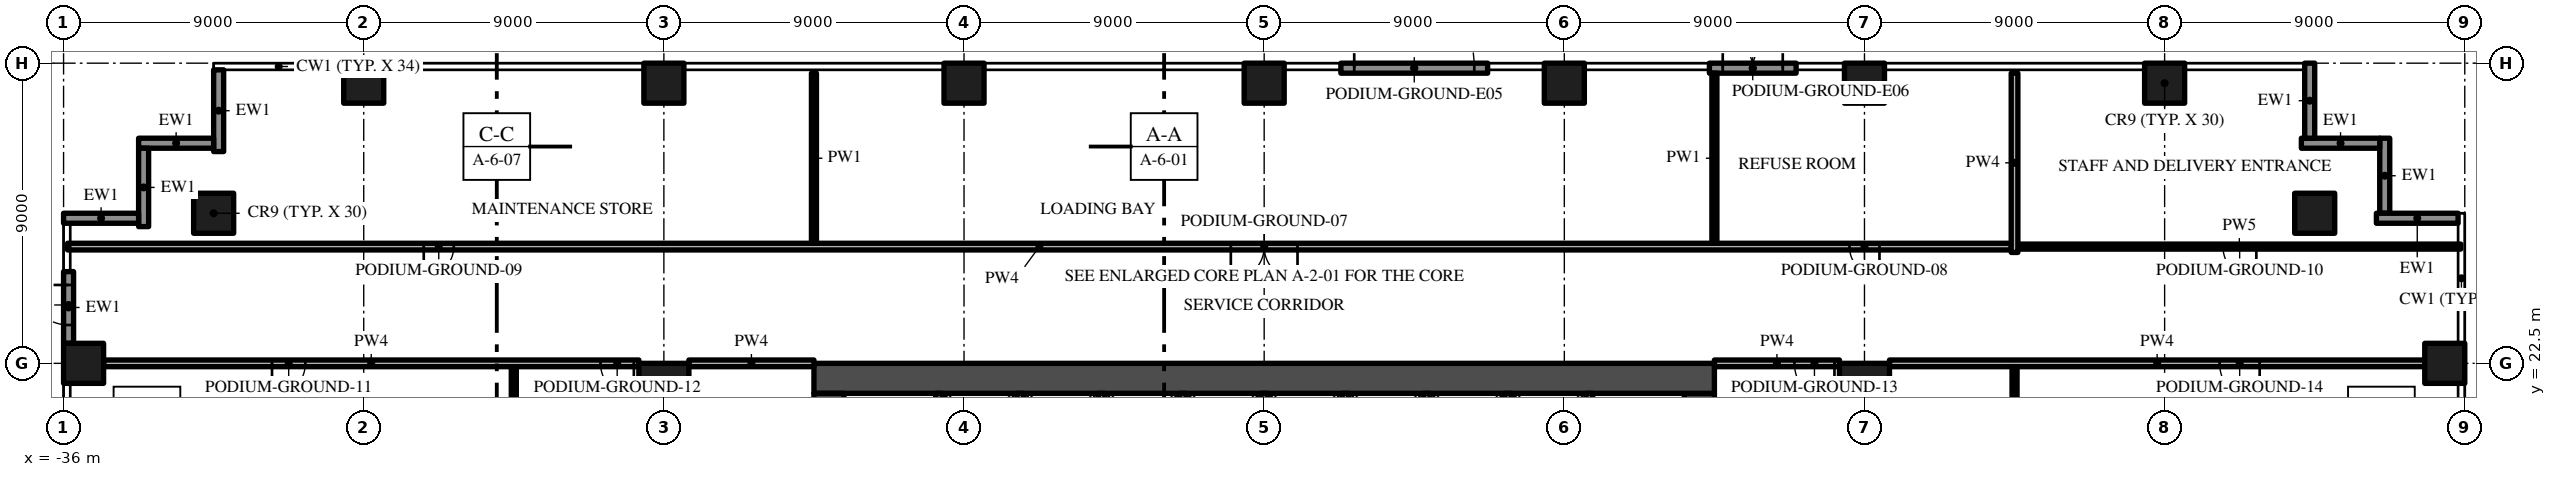
"""IFC4 building model, lengths in metres.
Left out: names, types, materials, properties, quantities, classifications, styles, units other than length and angle.
Written with IfcOpenShell. Run it as: python <this file> out.ifc"""

import sys

from ifc_helpers import new_model, si_unit, direction, frame, frame_2d, origin, origin_2d, place, context, subcontext, project, spatial, rectangle, extrude, element, fill, save


model = new_model("IFC4")
c1 = context("Model", 3, precision=1e-05, world=origin(), true_north=direction((0.0, 1.0)))
c2 = subcontext(c1, "Body", "Model", "MODEL_VIEW")
j1 = project(units=[si_unit("LENGTHUNIT", "METRE"), si_unit("PLANEANGLEUNIT", "RADIAN")], contexts=[c1])
p1 = place(None, origin())
s1 = spatial("IfcSite", under=j1, at=p1, CompositionType="ELEMENT")
p2 = place(p1, origin())
s2 = spatial("IfcBuilding", under=s1, at=p2, CompositionType="ELEMENT")
p3 = place(p2, origin())
s3 = spatial("IfcBuildingStorey", under=s2, at=p3, CompositionType="ELEMENT", Elevation=0.0)
p4 = place(p3, frame((13.05, 5.4, -2.2), z_axis=(0.0, 0.0, 1.0), x_axis=(0.0, 1.0, 0.0)))
e1 = element("IfcWall", 1, at=p4, inside=s3, PredefinedType="SHEAR", context=c2, shape_type="SweptSolid", body=[
    extrude(rectangle(XDim=16.2, YDim=0.9, at=frame_2d((8.1, 0.0))), origin(), (0.0, 0.0, 1.0), 7.8),
])
p5 = place(p4, frame((6.0, 0.0, 2.2)))
e2 = element("IfcOpeningElement", 2, at=p5, cuts=e1, PredefinedType="OPENING", context=c2, shape_type="SweptSolid", body=[
    extrude(rectangle(XDim=1.2, YDim=2.2, at=frame_2d((0.6, 1.1))), frame((0.0, 0.46, 0.0), z_axis=(0.0, -1.0, 0.0), x_axis=(1.0, 0.0, 0.0)), (0.0, 0.0, 1.0), 0.92),
])
p6 = place(p3, frame((13.5, 22.05, -2.2), z_axis=(0.0, 0.0, 1.0), x_axis=(-1.0, 0.0, 0.0)))
e3 = element("IfcWall", 3, at=p6, inside=s3, PredefinedType="SHEAR", context=c2, shape_type="SweptSolid", body=[
    extrude(rectangle(XDim=27.0, YDim=0.9, at=frame_2d((13.5, 0.0))), origin(), (0.0, 0.0, 1.0), 7.8),
])
p7 = place(p3, frame((-13.05, 21.6, -2.2), z_axis=(0.0, 0.0, 1.0), x_axis=(0.0, -1.0, 0.0)))
e4 = element("IfcWall", 4, at=p7, inside=s3, PredefinedType="SHEAR", context=c2, shape_type="SweptSolid", body=[
    extrude(rectangle(XDim=16.2, YDim=0.9, at=frame_2d((8.1, 0.0))), origin(), (0.0, 0.0, 1.0), 7.8),
])
p8 = place(p7, frame((9.0, 0.0, 2.2)))
e5 = element("IfcOpeningElement", 5, at=p8, cuts=e4, PredefinedType="OPENING", context=c2, shape_type="SweptSolid", body=[
    extrude(rectangle(XDim=1.2, YDim=2.2, at=frame_2d((0.6, 1.1))), frame((0.0, 0.46, 0.0), z_axis=(0.0, -1.0, 0.0), x_axis=(1.0, 0.0, 0.0)), (0.0, 0.0, 1.0), 0.92),
])
for number, where, z_axis, x_axis in (
    (6, (-18.0, 30.9, 0.0), (0.0, 0.0, 1.0), (1.0, 0.0, 0.0)),
    (7, (-27.0, 30.9, 0.0), (0.0, 0.0, 1.0), (1.0, 0.0, 0.0)),
    (8, (-35.4, 22.5, 0.0), (0.0, 0.0, 1.0), (1.0, 0.0, 0.0)),
    (9, (-31.5, 27.0, 0.0), (0.0, 0.0, 1.0), (1.0, 0.0, 0.0)),
    (10, (-9.0, 30.9, 0.0), (0.0, 0.0, 1.0), (1.0, 0.0, 0.0)),
    (11, (0.0, 30.9, 0.0), (0.0, 0.0, 1.0), (1.0, 0.0, 0.0)),
    (12, (18.0, 30.9, 0.0), (0.0, 0.0, 1.0), (1.0, 0.0, 0.0)),
    (13, (27.0, 30.9, 0.0), (0.0, 0.0, 1.0), (1.0, 0.0, 0.0)),
    (14, (35.4, 22.5, 0.0), (0.0, 0.0, 1.0), (1.0, 0.0, 0.0)),
    (15, (31.5, 27.0, 0.0), (0.0, 0.0, 1.0), (1.0, 0.0, 0.0)),
    (16, (9.0, 30.9, 0.0), (0.0, 0.0, 1.0), (1.0, 0.0, 0.0)),
):
    element("IfcColumn", number, at=place(p3, frame(where, z_axis=z_axis, x_axis=x_axis)), inside=s3, PredefinedType="COLUMN", context=c2, shape_type="SweptSolid", body=[
        extrude(rectangle(XDim=1.2, YDim=1.2, at=origin_2d()), origin(), (0.0, 0.0, 1.0), 5.6),
    ])
for number, where, z_axis, x_axis in (
    (17, (-18.0, 21.75, 0.0), (0.0, 0.0, 1.0), (1.0, 0.0, 0.0)),
    (18, (18.0, 21.75, 0.0), (0.0, 0.0, 1.0), (1.0, 0.0, 0.0)),
):
    element("IfcColumn", number, at=place(p3, frame(where, z_axis=z_axis, x_axis=x_axis)), inside=s3, PredefinedType="COLUMN", context=c2, shape_type="SweptSolid", body=[
        extrude(rectangle(XDim=1.5, YDim=1.5, at=origin_2d()), origin(), (0.0, 0.0, 1.0), 5.6),
    ])
p9 = place(p3, frame((33.35, 26.85, 0.0), z_axis=(0.0, 0.0, 1.0), x_axis=(1.0, 0.0, 0.0)))
e19 = element("IfcWall", 19, at=p9, inside=s3, PredefinedType="SOLIDWALL", context=c2, shape_type="SweptSolid", body=[
    extrude(rectangle(XDim=2.45, YDim=0.3, at=frame_2d((1.225, 0.0))), origin(), (0.0, 0.0, 1.0), 5.6),
])
p10 = place(p3, frame((33.6, 29.25, 0.0), z_axis=(0.0, 0.0, 1.0), x_axis=(0.0, -1.0, 0.0)))
e20 = element("IfcWall", 20, at=p10, inside=s3, PredefinedType="SOLIDWALL", context=c2, shape_type="SweptSolid", body=[
    extrude(rectangle(XDim=2.25, YDim=0.3, at=frame_2d((1.125, 0.0))), origin(), (0.0, 0.0, 1.0), 5.6),
])
p11 = place(p3, frame((31.1, 29.1, 0.0), z_axis=(0.0, 0.0, 1.0), x_axis=(1.0, 0.0, 0.0)))
e21 = element("IfcWall", 21, at=p11, inside=s3, PredefinedType="SOLIDWALL", context=c2, shape_type="SweptSolid", body=[
    extrude(rectangle(XDim=2.35, YDim=0.3, at=frame_2d((1.175, 0.0))), origin(), (0.0, 0.0, 1.0), 5.6),
])
p12 = place(p3, frame((31.35, 31.5, 0.0), z_axis=(0.0, 0.0, 1.0), x_axis=(0.0, -1.0, 0.0)))
e22 = element("IfcWall", 22, at=p12, inside=s3, PredefinedType="SOLIDWALL", context=c2, shape_type="SweptSolid", body=[
    extrude(rectangle(XDim=2.25, YDim=0.3, at=frame_2d((1.125, 0.0))), origin(), (0.0, 0.0, 1.0), 5.6),
])
p13 = place(p3, frame((2.3, 31.35, 0.0), z_axis=(0.0, 0.0, 1.0), x_axis=(1.0, 0.0, 0.0)))
e23 = element("IfcWall", 23, at=p13, inside=s3, PredefinedType="SOLIDWALL", context=c2, shape_type="SweptSolid", body=[
    extrude(rectangle(XDim=4.4, YDim=0.3, at=frame_2d((2.2, 0.0))), origin(), (0.0, 0.0, 1.0), 5.6),
])
p14 = place(p13, frame((0.4, 0.0, 0.0)))
e24 = element("IfcOpeningElement", 24, at=p14, cuts=e23, PredefinedType="OPENING", context=c2, shape_type="SweptSolid", body=[
    extrude(rectangle(XDim=3.6, YDim=3.0, at=frame_2d((1.8, 1.5))), frame((0.0, 0.16, 0.0), z_axis=(0.0, -1.0, 0.0), x_axis=(1.0, 0.0, 0.0)), (0.0, 0.0, 1.0), 0.32),
])
p15 = place(p3, frame((13.35, 31.35, 0.0), z_axis=(0.0, 0.0, 1.0), x_axis=(1.0, 0.0, 0.0)))
e25 = element("IfcWall", 25, at=p15, inside=s3, PredefinedType="SOLIDWALL", context=c2, shape_type="SweptSolid", body=[
    extrude(rectangle(XDim=2.6, YDim=0.3, at=frame_2d((1.3, 0.0))), origin(), (0.0, 0.0, 1.0), 5.6),
])
p16 = place(p15, frame((0.4, 0.0, 0.0)))
e26 = element("IfcOpeningElement", 26, at=p16, cuts=e25, PredefinedType="OPENING", context=c2, shape_type="SweptSolid", body=[
    extrude(rectangle(XDim=1.8, YDim=2.4, at=frame_2d((0.9, 1.2))), frame((0.0, 0.16, 0.0), z_axis=(0.0, -1.0, 0.0), x_axis=(1.0, 0.0, 0.0)), (0.0, 0.0, 1.0), 0.32),
])
p17 = place(p3, frame((-31.35, 28.85, 0.0), z_axis=(0.0, 0.0, 1.0), x_axis=(0.0, 1.0, 0.0)))
e27 = element("IfcWall", 27, at=p17, inside=s3, PredefinedType="SOLIDWALL", context=c2, shape_type="SweptSolid", body=[
    extrude(rectangle(XDim=2.45, YDim=0.3, at=frame_2d((1.225, 0.0))), origin(), (0.0, 0.0, 1.0), 5.6),
])
p18 = place(p3, frame((-33.75, 29.1, 0.0), z_axis=(0.0, 0.0, 1.0), x_axis=(1.0, 0.0, 0.0)))
e28 = element("IfcWall", 28, at=p18, inside=s3, PredefinedType="SOLIDWALL", context=c2, shape_type="SweptSolid", body=[
    extrude(rectangle(XDim=2.25, YDim=0.3, at=frame_2d((1.125, 0.0))), origin(), (0.0, 0.0, 1.0), 5.6),
])
p19 = place(p3, frame((-33.6, 26.6, 0.0), z_axis=(0.0, 0.0, 1.0), x_axis=(0.0, 1.0, 0.0)))
e29 = element("IfcWall", 29, at=p19, inside=s3, PredefinedType="SOLIDWALL", context=c2, shape_type="SweptSolid", body=[
    extrude(rectangle(XDim=2.35, YDim=0.3, at=frame_2d((1.175, 0.0))), origin(), (0.0, 0.0, 1.0), 5.6),
])
p20 = place(p3, frame((-36.0, 26.85, 0.0), z_axis=(0.0, 0.0, 1.0), x_axis=(1.0, 0.0, 0.0)))
e30 = element("IfcWall", 30, at=p20, inside=s3, PredefinedType="SOLIDWALL", context=c2, shape_type="SweptSolid", body=[
    extrude(rectangle(XDim=2.25, YDim=0.3, at=frame_2d((1.125, 0.0))), origin(), (0.0, 0.0, 1.0), 5.6),
])
p21 = place(p3, frame((-35.85, 23.1, 0.0), z_axis=(0.0, 0.0, 1.0), x_axis=(0.0, 1.0, 0.0)))
e31 = element("IfcWall", 31, at=p21, inside=s3, PredefinedType="SOLIDWALL", context=c2, shape_type="SweptSolid", body=[
    extrude(rectangle(XDim=2.15, YDim=0.3, at=frame_2d((1.075, 0.0))), origin(), (0.0, 0.0, 1.0), 5.6),
])
p22 = place(p21, frame((0.55, 0.0, 0.0)))
e32 = element("IfcOpeningElement", 32, at=p22, cuts=e31, PredefinedType="OPENING", context=c2, shape_type="SweptSolid", body=[
    extrude(rectangle(XDim=1.2, YDim=2.4, at=frame_2d((0.6, 1.2))), frame((0.0, 0.16, 0.0), z_axis=(0.0, -1.0, 0.0), x_axis=(1.0, 0.0, 0.0)), (0.0, 0.0, 1.0), 0.32),
])
for number, where, z_axis, x_axis in (
    (33, (-9.75, 19.4, -0.4), (0.0, 0.0, 1.0), (0.0, 1.0, 0.0)),
    (34, (-7.312, 19.4, -0.4), (0.0, 0.0, 1.0), (0.0, 1.0, 0.0)),
    (35, (-4.875, 19.4, -0.4), (0.0, 0.0, 1.0), (0.0, 1.0, 0.0)),
    (36, (-2.438, 19.4, -0.4), (0.0, 0.0, 1.0), (0.0, 1.0, 0.0)),
    (37, (0.0, 19.4, -0.4), (0.0, 0.0, 1.0), (0.0, 1.0, 0.0)),
    (38, (2.438, 19.4, -0.4), (0.0, 0.0, 1.0), (0.0, 1.0, 0.0)),
    (39, (4.875, 19.4, -0.4), (0.0, 0.0, 1.0), (0.0, 1.0, 0.0)),
    (40, (7.312, 19.4, -0.4), (0.0, 0.0, 1.0), (0.0, 1.0, 0.0)),
    (41, (9.75, 19.4, -0.4), (0.0, 0.0, 1.0), (0.0, 1.0, 0.0)),
):
    element("IfcWall", number, at=place(p3, frame(where, z_axis=z_axis, x_axis=x_axis)), inside=s3, PredefinedType="PARTITIONING", context=c2, shape_type="SweptSolid", body=[
        extrude(rectangle(XDim=2.2, YDim=0.2, at=frame_2d((1.1, 0.0))), origin(), (0.0, 0.0, 1.0), 6.0),
    ])
p23 = place(p3, frame((-18.75, 22.5, 0.0), z_axis=(0.0, 0.0, 1.0), x_axis=(-1.0, 0.0, 0.0)))
e42 = element("IfcWall", 42, at=p23, inside=s3, PredefinedType="PARTITIONING", context=c2, shape_type="SweptSolid", body=[
    extrude(rectangle(XDim=16.05, YDim=0.2, at=frame_2d((8.025, 0.0))), origin(), (0.0, 0.0, 1.0), 5.6),
])
p24 = place(p23, frame((10.0, 0.0, 0.0)))
e43 = element("IfcOpeningElement", 43, at=p24, cuts=e42, PredefinedType="OPENING", context=c2, shape_type="SweptSolid", body=[
    extrude(rectangle(XDim=1.0, YDim=2.4, at=frame_2d((0.5, 1.2))), frame((0.0, 0.11, 0.0), z_axis=(0.0, -1.0, 0.0), x_axis=(1.0, 0.0, 0.0)), (0.0, 0.0, 1.0), 0.22),
])
p25 = place(p23, frame((0.15, 0.0, 0.0)))
e44 = element("IfcOpeningElement", 44, at=p25, cuts=e42, PredefinedType="OPENING", context=c2, shape_type="SweptSolid", body=[
    extrude(rectangle(XDim=1.0, YDim=2.4, at=frame_2d((0.5, 1.2))), frame((0.0, 0.11, 0.0), z_axis=(0.0, -1.0, 0.0), x_axis=(1.0, 0.0, 0.0)), (0.0, 0.0, 1.0), 0.22),
])
p26 = place(p3, frame((-17.25, 22.5, 0.0), z_axis=(0.0, 0.0, 1.0), x_axis=(1.0, 0.0, 0.0)))
e45 = element("IfcWall", 45, at=p26, inside=s3, PredefinedType="PARTITIONING", context=c2, shape_type="SweptSolid", body=[
    extrude(rectangle(XDim=3.75, YDim=0.2, at=frame_2d((1.875, 0.0))), origin(), (0.0, 0.0, 1.0), 5.6),
])
p27 = place(p3, frame((17.25, 22.5, 0.0), z_axis=(0.0, 0.0, 1.0), x_axis=(-1.0, 0.0, 0.0)))
e46 = element("IfcWall", 46, at=p27, inside=s3, PredefinedType="PARTITIONING", context=c2, shape_type="SweptSolid", body=[
    extrude(rectangle(XDim=3.75, YDim=0.2, at=frame_2d((1.875, 0.0))), origin(), (0.0, 0.0, 1.0), 5.6),
])
p28 = place(p27, frame((0.15, 0.0, 0.0)))
e47 = element("IfcOpeningElement", 47, at=p28, cuts=e46, PredefinedType="OPENING", context=c2, shape_type="SweptSolid", body=[
    extrude(rectangle(XDim=1.2, YDim=2.4, at=frame_2d((0.6, 1.2))), frame((0.0, 0.11, 0.0), z_axis=(0.0, -1.0, 0.0), x_axis=(1.0, 0.0, 0.0)), (0.0, 0.0, 1.0), 0.22),
])
p29 = place(p3, frame((34.8, 22.5, 0.0), z_axis=(0.0, 0.0, 1.0), x_axis=(-1.0, 0.0, 0.0)))
e48 = element("IfcWall", 48, at=p29, inside=s3, PredefinedType="PARTITIONING", context=c2, shape_type="SweptSolid", body=[
    extrude(rectangle(XDim=16.05, YDim=0.2, at=frame_2d((8.025, 0.0))), origin(), (0.0, 0.0, 1.0), 5.6),
])
p30 = place(p29, frame((4.95, 0.0, 0.0)))
e49 = element("IfcOpeningElement", 49, at=p30, cuts=e48, PredefinedType="OPENING", context=c2, shape_type="SweptSolid", body=[
    extrude(rectangle(XDim=1.2, YDim=2.4, at=frame_2d((0.6, 1.2))), frame((0.0, 0.11, 0.0), z_axis=(0.0, -1.0, 0.0), x_axis=(1.0, 0.0, 0.0)), (0.0, 0.0, 1.0), 0.22),
])
p31 = place(p3, frame((22.4, 26.0, 0.0), z_axis=(0.0, 0.0, 1.0), x_axis=(-1.0, 0.0, 0.0)))
e50 = element("IfcWall", 50, at=p31, inside=s3, PredefinedType="PARTITIONING", context=c2, shape_type="SweptSolid", body=[
    extrude(rectangle(XDim=58.28, YDim=0.2, at=frame_2d((29.14, 0.0))), origin(), (0.0, 0.0, 1.0), 5.6),
])
p32 = place(p31, frame((21.4, 0.0, 0.0)))
e51 = element("IfcOpeningElement", 51, at=p32, cuts=e50, PredefinedType="OPENING", context=c2, shape_type="SweptSolid", body=[
    extrude(rectangle(XDim=2.0, YDim=2.4, at=frame_2d((1.0, 1.2))), frame((0.0, 0.11, 0.0), z_axis=(0.0, -1.0, 0.0), x_axis=(1.0, 0.0, 0.0)), (0.0, 0.0, 1.0), 0.22),
])
p33 = place(p31, frame((3.95, 0.0, 0.0)))
e52 = element("IfcOpeningElement", 52, at=p33, cuts=e50, PredefinedType="OPENING", context=c2, shape_type="SweptSolid", body=[
    extrude(rectangle(XDim=0.9, YDim=2.1, at=frame_2d((0.45, 1.05))), frame((0.0, 0.11, 0.0), z_axis=(0.0, -1.0, 0.0), x_axis=(1.0, 0.0, 0.0)), (0.0, 0.0, 1.0), 0.22),
])
p34 = place(p31, frame((46.7, 0.0, 0.0)))
e53 = element("IfcOpeningElement", 53, at=p34, cuts=e50, PredefinedType="OPENING", context=c2, shape_type="SweptSolid", body=[
    extrude(rectangle(XDim=0.9, YDim=2.1, at=frame_2d((0.45, 1.05))), frame((0.0, 0.11, 0.0), z_axis=(0.0, -1.0, 0.0), x_axis=(1.0, 0.0, 0.0)), (0.0, 0.0, 1.0), 0.22),
])
p35 = place(p3, frame((35.88, 26.0, 0.0), z_axis=(0.0, 0.0, 1.0), x_axis=(-1.0, 0.0, 0.0)))
e54 = element("IfcWall", 54, at=p35, inside=s3, PredefinedType="PARTITIONING", context=c2, shape_type="SweptSolid", body=[
    extrude(rectangle(XDim=13.28, YDim=0.15, at=frame_2d((6.64, 0.0))), origin(), (0.0, 0.0, 1.0), 5.6),
])
p36 = place(p35, frame((6.13, 0.0, 0.0)))
e55 = element("IfcOpeningElement", 55, at=p36, cuts=e54, PredefinedType="OPENING", context=c2, shape_type="SweptSolid", body=[
    extrude(rectangle(XDim=1.0, YDim=2.4, at=frame_2d((0.5, 1.2))), frame((0.0, 0.085, 0.0), z_axis=(0.0, -1.0, 0.0), x_axis=(1.0, 0.0, 0.0)), (0.0, 0.0, 1.0), 0.17),
])
p37 = place(p3, frame((-22.5, 18.75, 0.0), z_axis=(0.0, 0.0, 1.0), x_axis=(0.0, 1.0, 0.0)))
e56 = element("IfcWall", 56, at=p37, inside=s3, PredefinedType="PARTITIONING", context=c2, shape_type="SweptSolid", body=[
    extrude(rectangle(XDim=3.65, YDim=0.15, at=frame_2d((1.825, 0.0))), origin(), (0.0, 0.0, 1.0), 5.6),
])
for number, where, z_axis, x_axis in (
    (57, (-13.5, 26.1, 0.0), (0.0, 0.0, 1.0), (0.0, 1.0, 0.0)),
    (58, (13.5, 26.1, 0.0), (0.0, 0.0, 1.0), (0.0, 1.0, 0.0)),
):
    element("IfcWall", number, at=place(p3, frame(where, z_axis=z_axis, x_axis=x_axis)), inside=s3, PredefinedType="PARTITIONING", context=c2, shape_type="SweptSolid", body=[
        extrude(rectangle(XDim=5.1, YDim=0.15, at=frame_2d((2.55, 0.0))), origin(), (0.0, 0.0, 1.0), 5.6),
    ])
p38 = place(p3, frame((22.5, 25.825, 0.0), z_axis=(0.0, 0.0, 1.0), x_axis=(0.0, 1.0, 0.0)))
e59 = element("IfcWall", 59, at=p38, inside=s3, PredefinedType="PARTITIONING", context=c2, shape_type="SweptSolid", body=[
    extrude(rectangle(XDim=5.375, YDim=0.2, at=frame_2d((2.688, 0.0))), origin(), (0.0, 0.0, 1.0), 5.6),
])
p39 = place(p3, frame((22.5, 18.75, 0.0), z_axis=(0.0, 0.0, 1.0), x_axis=(0.0, 1.0, 0.0)))
e60 = element("IfcWall", 60, at=p39, inside=s3, PredefinedType="PARTITIONING", context=c2, shape_type="SweptSolid", body=[
    extrude(rectangle(XDim=3.65, YDim=0.15, at=frame_2d((1.825, 0.0))), origin(), (0.0, 0.0, 1.0), 5.6),
])
p40 = place(p14, origin())
e61 = element("IfcDoor", 61, at=p40, inside=s3, OperationType="SINGLE_SWING_LEFT", PredefinedType="DOOR", context=c2, shape_type="SweptSolid", body=[
    extrude(rectangle(XDim=3.6, YDim=3.0, at=frame_2d((1.8, 1.5))), frame((0.0, 0.025, 0.0), z_axis=(0.0, -1.0, 0.0), x_axis=(1.0, 0.0, 0.0)), (0.0, 0.0, 1.0), 0.05),
])
fill(e24, e61)
p41 = place(p16, origin())
e62 = element("IfcDoor", 62, at=p41, inside=s3, OperationType="SINGLE_SWING_LEFT", PredefinedType="DOOR", context=c2, shape_type="SweptSolid", body=[
    extrude(rectangle(XDim=1.8, YDim=2.4, at=frame_2d((0.9, 1.2))), frame((0.0, 0.025, 0.0), z_axis=(0.0, -1.0, 0.0), x_axis=(1.0, 0.0, 0.0)), (0.0, 0.0, 1.0), 0.05),
])
fill(e26, e62)
p42 = place(p22, origin())
e63 = element("IfcDoor", 63, at=p42, inside=s3, OperationType="SINGLE_SWING_LEFT", PredefinedType="DOOR", context=c2, shape_type="SweptSolid", body=[
    extrude(rectangle(XDim=1.2, YDim=2.4, at=frame_2d((0.6, 1.2))), frame((0.0, 0.025, 0.0), z_axis=(0.0, -1.0, 0.0), x_axis=(1.0, 0.0, 0.0)), (0.0, 0.0, 1.0), 0.05),
])
fill(e32, e63)
p43 = place(p32, origin())
e64 = element("IfcDoor", 64, at=p43, inside=s3, OperationType="DOUBLE_DOOR_SINGLE_SWING", PredefinedType="DOOR", context=c2, shape_type="SweptSolid", body=[
    extrude(rectangle(XDim=2.0, YDim=2.4, at=frame_2d((1.0, 1.2))), frame((0.0, 0.025, 0.0), z_axis=(0.0, -1.0, 0.0), x_axis=(1.0, 0.0, 0.0)), (0.0, 0.0, 1.0), 0.05),
])
fill(e51, e64)
p44 = place(p33, origin())
e65 = element("IfcDoor", 65, at=p44, inside=s3, OperationType="SINGLE_SWING_LEFT", PredefinedType="DOOR", context=c2, shape_type="SweptSolid", body=[
    extrude(rectangle(XDim=0.9, YDim=2.1, at=frame_2d((0.45, 1.05))), frame((0.0, 0.025, 0.0), z_axis=(0.0, -1.0, 0.0), x_axis=(1.0, 0.0, 0.0)), (0.0, 0.0, 1.0), 0.05),
])
fill(e52, e65)
p45 = place(p34, origin())
e66 = element("IfcDoor", 66, at=p45, inside=s3, OperationType="SINGLE_SWING_RIGHT", PredefinedType="DOOR", context=c2, shape_type="SweptSolid", body=[
    extrude(rectangle(XDim=0.9, YDim=2.1, at=frame_2d((0.45, 1.05))), frame((0.0, 0.025, 0.0), z_axis=(0.0, -1.0, 0.0), x_axis=(1.0, 0.0, 0.0)), (0.0, 0.0, 1.0), 0.05),
])
fill(e53, e66)
p46 = place(p36, origin())
e67 = element("IfcDoor", 67, at=p46, inside=s3, OperationType="SINGLE_SWING_LEFT", PredefinedType="DOOR", context=c2, shape_type="SweptSolid", body=[
    extrude(rectangle(XDim=1.0, YDim=2.4, at=frame_2d((0.5, 1.2))), frame((0.0, 0.025, 0.0), z_axis=(0.0, -1.0, 0.0), x_axis=(1.0, 0.0, 0.0)), (0.0, 0.0, 1.0), 0.05),
])
fill(e55, e67)
p47 = place(p24, origin())
e68 = element("IfcDoor", 68, at=p47, inside=s3, OperationType="SINGLE_SWING_RIGHT", PredefinedType="DOOR", context=c2, shape_type="SweptSolid", body=[
    extrude(rectangle(XDim=1.0, YDim=2.4, at=frame_2d((0.5, 1.2))), frame((0.0, 0.025, 0.0), z_axis=(0.0, -1.0, 0.0), x_axis=(1.0, 0.0, 0.0)), (0.0, 0.0, 1.0), 0.05),
])
fill(e43, e68)
p48 = place(p25, origin())
e69 = element("IfcDoor", 69, at=p48, inside=s3, OperationType="SINGLE_SWING_LEFT", PredefinedType="DOOR", context=c2, shape_type="SweptSolid", body=[
    extrude(rectangle(XDim=1.0, YDim=2.4, at=frame_2d((0.5, 1.2))), frame((0.0, 0.025, 0.0), z_axis=(0.0, -1.0, 0.0), x_axis=(1.0, 0.0, 0.0)), (0.0, 0.0, 1.0), 0.05),
])
fill(e44, e69)
p49 = place(p28, origin())
e70 = element("IfcDoor", 70, at=p49, inside=s3, OperationType="SINGLE_SWING_LEFT", PredefinedType="DOOR", context=c2, shape_type="SweptSolid", body=[
    extrude(rectangle(XDim=1.2, YDim=2.4, at=frame_2d((0.6, 1.2))), frame((0.0, 0.025, 0.0), z_axis=(0.0, -1.0, 0.0), x_axis=(1.0, 0.0, 0.0)), (0.0, 0.0, 1.0), 0.05),
])
fill(e47, e70)
p50 = place(p30, origin())
e71 = element("IfcDoor", 71, at=p50, inside=s3, OperationType="SINGLE_SWING_LEFT", PredefinedType="DOOR", context=c2, shape_type="SweptSolid", body=[
    extrude(rectangle(XDim=1.2, YDim=2.4, at=frame_2d((0.6, 1.2))), frame((0.0, 0.025, 0.0), z_axis=(0.0, -1.0, 0.0), x_axis=(1.0, 0.0, 0.0)), (0.0, 0.0, 1.0), 0.05),
])
fill(e49, e71)
save(model, sys.argv[1])
